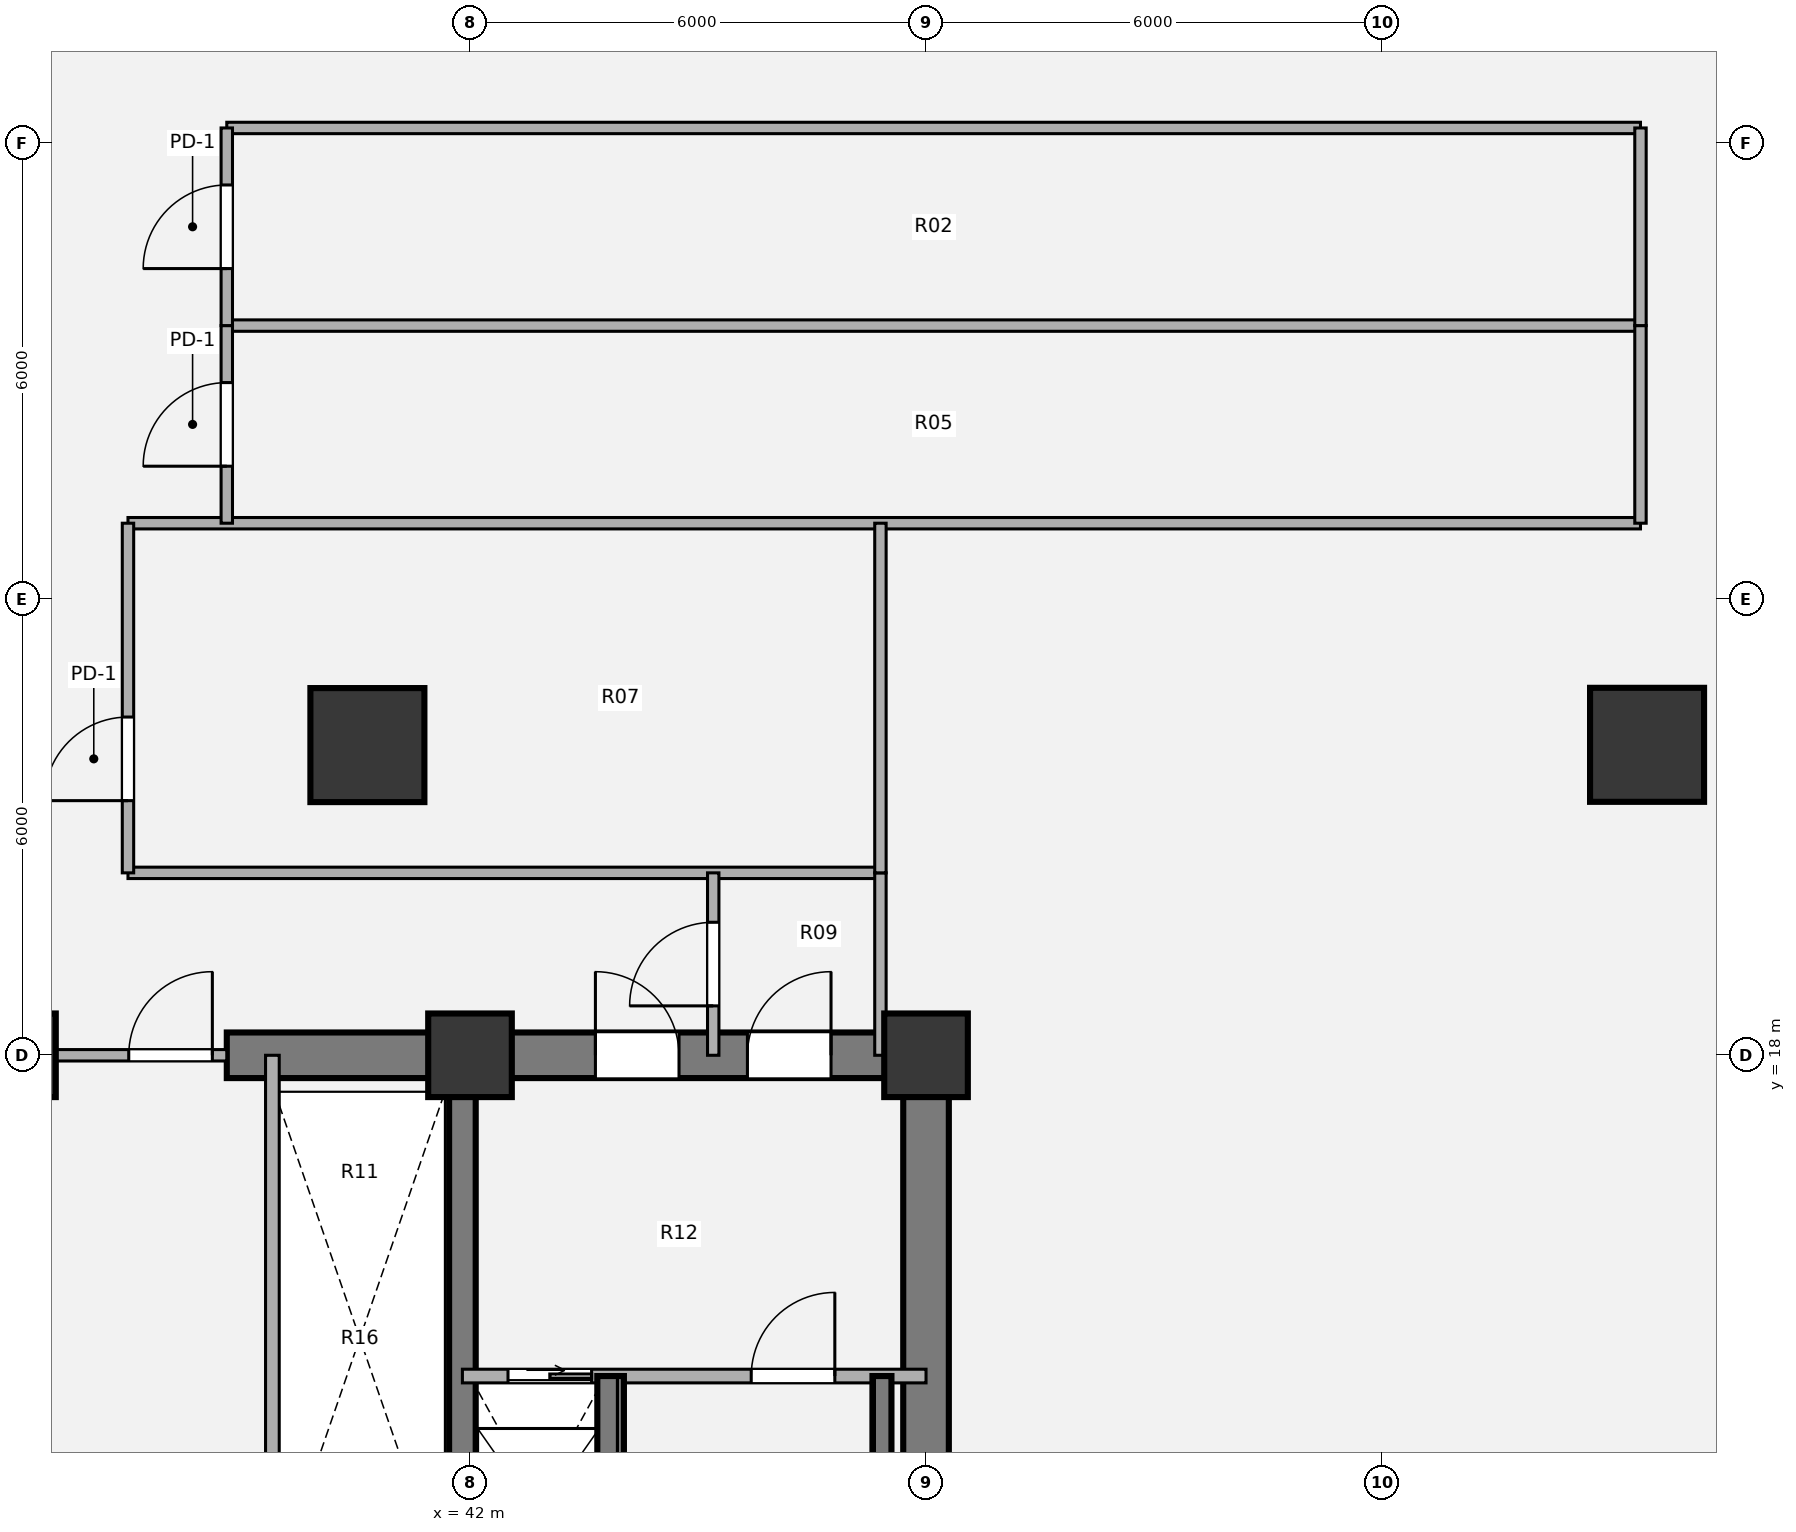
"""IFC4 building model, lengths in metres.
Left out: names, types, materials, properties, quantities, classifications, styles, units other than length and angle.
Written with IfcOpenShell. Run it as: python <this file> out.ifc"""

import sys

from ifc_helpers import new_model, si_unit, direction, frame, frame_2d, origin, origin_2d, place, context, subcontext, project, spatial, rectangle, hollow_circle, extrude, source, transform, mapped, element, fill, save


model = new_model("IFC4")
c1 = context("Model", 3, precision=1e-05, world=origin(), true_north=direction((0.0, 1.0)))
c2 = subcontext(c1, "Body", "Model", "MODEL_VIEW")
j1 = project(units=[si_unit("LENGTHUNIT", "METRE"), si_unit("PLANEANGLEUNIT", "RADIAN")], contexts=[c1])
p1 = place(None, origin())
s1 = spatial("IfcSite", under=j1, at=p1, CompositionType="ELEMENT")
p2 = place(p1, origin())
s2 = spatial("IfcBuilding", under=s1, at=p2, CompositionType="ELEMENT")
p3 = place(p2, frame((0.0, 0.0, 79.92)))
s3 = spatial("IfcBuildingStorey", under=s2, at=p3, CompositionType="ELEMENT", Elevation=79.92)
m1 = source(origin(), c2, "Body", "SweptSolid", [
    extrude(rectangle(XDim=1.1, YDim=1.1, at=origin_2d()), origin(), (0.0, 0.0, 1.0), 5.4),
])
for number, where, z_axis, x_axis in (
    (1, (36.0, 18.0, 0.0), (0.0, 0.0, 1.0), (1.0, 0.0, 0.0)),
    (2, (42.0, 18.0, 0.0), (0.0, 0.0, 1.0), (1.0, 0.0, 0.0)),
    (3, (48.0, 18.0, 0.0), (0.0, 0.0, 1.0), (1.0, 0.0, 0.0)),
):
    element("IfcColumn", number, at=place(p3, frame(where, z_axis=z_axis, x_axis=x_axis)), inside=s3, PredefinedType="COLUMN", context=c2, shape_type="MappedRepresentation", body=[
        mapped(m1, transform((0.0, 0.0, 0.0), x_axis=(1.0, 0.0, 0.0), y_axis=(0.0, 1.0, 0.0), z_axis=(0.0, 0.0, 1.0), scale=1.0)),
    ])
p4 = place(p3, frame((48.0, 18.0, 0.0), z_axis=(0.0, 0.0, 1.0), x_axis=(0.0, -1.0, 0.0)))
e4 = element("IfcWall", 4, at=p4, inside=s3, PredefinedType="SHEAR", context=c2, shape_type="SweptSolid", body=[
    extrude(rectangle(XDim=12.0, YDim=0.6, at=frame_2d((6.0, 0.0))), origin(), (0.0, 0.0, 1.0), 5.4),
])
p5 = place(p3, frame((38.8, 18.0, 0.0), z_axis=(0.0, 0.0, 1.0), x_axis=(1.0, 0.0, 0.0)))
e5 = element("IfcWall", 5, at=p5, inside=s3, PredefinedType="SHEAR", context=c2, shape_type="SweptSolid", body=[
    extrude(rectangle(XDim=9.5, YDim=0.6, at=frame_2d((4.75, 0.0))), origin(), (0.0, 0.0, 1.0), 5.4),
])
p6 = place(p5, frame((4.85, 0.0, 0.0)))
e6 = element("IfcOpeningElement", 6, at=p6, cuts=e5, PredefinedType="OPENING", context=c2, shape_type="SweptSolid", body=[
    extrude(rectangle(XDim=1.1, YDim=2.1, at=origin_2d()), frame((0.55, 0.31, 1.05), z_axis=(0.0, -1.0, 0.0), x_axis=(1.0, 0.0, 0.0)), (0.0, 0.0, 1.0), 0.62),
])
p7 = place(p5, frame((6.85, 0.0, 0.0)))
e7 = element("IfcOpeningElement", 7, at=p7, cuts=e5, PredefinedType="OPENING", context=c2, shape_type="SweptSolid", body=[
    extrude(rectangle(XDim=1.1, YDim=2.1, at=origin_2d()), frame((0.55, 0.31, 1.05), z_axis=(0.0, -1.0, 0.0), x_axis=(1.0, 0.0, 0.0)), (0.0, 0.0, 1.0), 0.62),
])
p8 = place(p3, frame((41.9, 18.0, 0.0), z_axis=(0.0, 0.0, 1.0), x_axis=(0.0, -1.0, 0.0)))
e8 = element("IfcWall", 8, at=p8, inside=s3, PredefinedType="SHEAR", context=c2, shape_type="SweptSolid", body=[
    extrude(rectangle(XDim=12.0, YDim=0.35, at=frame_2d((6.0, 0.0))), origin(), (0.0, 0.0, 1.0), 5.4),
])
p9 = place(p8, frame((10.08, 0.0, 0.0)))
e9 = element("IfcOpeningElement", 9, at=p9, cuts=e8, PredefinedType="OPENING", context=c2, shape_type="SweptSolid", body=[
    extrude(rectangle(XDim=1.3, YDim=2.1, at=origin_2d()), frame((0.65, 0.185, 1.05), z_axis=(0.0, -1.0, 0.0), x_axis=(1.0, 0.0, 0.0)), (0.0, 0.0, 1.0), 0.37),
])
m2 = source(origin(), c2, "Body", "SweptSolid", [
    extrude(hollow_circle(Radius=0.75, WallThickness=0.05, at=origin_2d()), origin(), (0.0, 0.0, 1.0), 6.169),
])
p10 = place(p3, frame((57.96, 20.292, 0.47), z_axis=(-0.153353617599, 0.581200316919, 0.799180117109), x_axis=(-0.966908028217, -0.255125194698, 0.0)))
e10 = element("IfcColumn", 10, at=p10, inside=s3, PredefinedType="COLUMN", context=c2, shape_type="MappedRepresentation", body=[
    mapped(m2, transform((0.0, 0.0, 0.0), x_axis=(1.0, 0.0, 0.0), y_axis=(0.0, 1.0, 0.0), z_axis=(0.0, 0.0, 1.0), scale=1.0)),
])
m3 = source(origin(), c2, "Body", "SweptSolid", [
    extrude(hollow_circle(Radius=0.75, WallThickness=0.05, at=origin_2d()), origin(), (0.0, 0.0, 1.0), 6.48),
])
p11 = place(p3, frame((57.952, 30.884, 0.511), z_axis=(-0.144794363389, 0.640139535252, 0.754490535221), x_axis=(-0.975360167554, -0.220618547611, 0.0)))
e11 = element("IfcColumn", 11, at=p11, inside=s3, PredefinedType="COLUMN", context=c2, shape_type="MappedRepresentation", body=[
    mapped(m3, transform((0.0, 0.0, 0.0), x_axis=(1.0, 0.0, 0.0), y_axis=(0.0, 1.0, 0.0), z_axis=(0.0, 0.0, 1.0), scale=1.0)),
])
m4 = source(origin(), c2, "Body", "SweptSolid", [
    extrude(hollow_circle(Radius=0.75, WallThickness=0.05, at=origin_2d()), origin(), (0.0, 0.0, 1.0), 6.108),
])
p12 = place(p3, frame((40.65, 20.285, 0.46), z_axis=(0.0, 0.588155061487, 0.808748183087), x_axis=(-1.0, 0.0, 0.0)))
e12 = element("IfcColumn", 12, at=p12, inside=s3, PredefinedType="COLUMN", context=c2, shape_type="MappedRepresentation", body=[
    mapped(m4, transform((0.0, 0.0, 0.0), x_axis=(1.0, 0.0, 0.0), y_axis=(0.0, 1.0, 0.0), z_axis=(0.0, 0.0, 1.0), scale=1.0)),
])
p13 = place(p3, frame((39.4, 11.0, 0.0), z_axis=(0.0, 0.0, 1.0), x_axis=(0.0, 1.0, 0.0)))
e13 = element("IfcWall", 13, at=p13, inside=s3, PredefinedType="PARTITIONING", context=c2, shape_type="SweptSolid", body=[
    extrude(rectangle(XDim=7.0, YDim=0.18, at=frame_2d((3.5, 0.0))), origin(), (0.0, 0.0, 1.0), 5.05),
])
p14 = place(p3, frame((33.2, 18.0, 0.0), z_axis=(0.0, 0.0, 1.0), x_axis=(1.0, 0.0, 0.0)))
e14 = element("IfcWall", 14, at=p14, inside=s3, PredefinedType="PARTITIONING", context=c2, shape_type="SweptSolid", body=[
    extrude(rectangle(XDim=5.6, YDim=0.15, at=frame_2d((2.8, 0.0))), origin(), (0.0, 0.0, 1.0), 3.865),
])
p15 = place(p14, frame((0.19, 0.0, 0.0)))
e15 = element("IfcOpeningElement", 15, at=p15, cuts=e14, PredefinedType="OPENING", context=c2, shape_type="SweptSolid", body=[
    extrude(rectangle(XDim=1.1, YDim=2.1, at=origin_2d()), frame((0.55, 0.085, 1.05), z_axis=(0.0, -1.0, 0.0), x_axis=(1.0, 0.0, 0.0)), (0.0, 0.0, 1.0), 0.17),
])
p16 = place(p14, frame((4.31, 0.0, 0.0)))
e16 = element("IfcOpeningElement", 16, at=p16, cuts=e14, PredefinedType="OPENING", context=c2, shape_type="SweptSolid", body=[
    extrude(rectangle(XDim=1.1, YDim=2.1, at=origin_2d()), frame((0.55, 0.085, 1.05), z_axis=(0.0, -1.0, 0.0), x_axis=(1.0, 0.0, 0.0)), (0.0, 0.0, 1.0), 0.17),
])
p17 = place(p3, frame((41.9, 13.78, 0.0), z_axis=(0.0, 0.0, 1.0), x_axis=(1.0, 0.0, 0.0)))
e17 = element("IfcWall", 17, at=p17, inside=s3, PredefinedType="PARTITIONING", context=c2, shape_type="SweptSolid", body=[
    extrude(rectangle(XDim=6.1, YDim=0.18, at=frame_2d((3.05, 0.0))), origin(), (0.0, 0.0, 1.0), 2.229),
])
p18 = place(p17, frame((0.6, 0.0, 0.0)))
e18 = element("IfcOpeningElement", 18, at=p18, cuts=e17, PredefinedType="OPENING", context=c2, shape_type="SweptSolid", body=[
    extrude(rectangle(XDim=1.1, YDim=2.1, at=origin_2d()), frame((0.55, 0.1, 1.05), z_axis=(0.0, -1.0, 0.0), x_axis=(1.0, 0.0, 0.0)), (0.0, 0.0, 1.0), 0.2),
])
p19 = place(p17, frame((3.8, 0.0, 0.0)))
e19 = element("IfcOpeningElement", 19, at=p19, cuts=e17, PredefinedType="OPENING", context=c2, shape_type="SweptSolid", body=[
    extrude(rectangle(XDim=1.1, YDim=2.1, at=origin_2d()), frame((0.55, 0.1, 1.05), z_axis=(0.0, -1.0, 0.0), x_axis=(1.0, 0.0, 0.0)), (0.0, 0.0, 1.0), 0.2),
])
p20 = place(p3, frame((43.85, 6.0, 0.0), z_axis=(0.0, 0.0, 1.0), x_axis=(0.0, 1.0, 0.0)))
e20 = element("IfcWall", 20, at=p20, inside=s3, PredefinedType="SHEAR", context=c2, shape_type="SweptSolid", body=[
    extrude(rectangle(XDim=7.78, YDim=0.35, at=frame_2d((3.89, 0.0))), origin(), (0.0, 0.0, 1.0), 5.4),
])
p21 = place(p3, frame((47.42, 6.0, 0.0), z_axis=(0.0, 0.0, 1.0), x_axis=(0.0, 1.0, 0.0)))
e21 = element("IfcWall", 21, at=p21, inside=s3, PredefinedType="SHEAR", context=c2, shape_type="SweptSolid", body=[
    extrude(rectangle(XDim=7.78, YDim=0.25, at=frame_2d((3.89, 0.0))), origin(), (0.0, 0.0, 1.0), 5.4),
])
p22 = place(p3, frame((37.5, 20.4, 0.0), z_axis=(0.0, 0.0, 1.0), x_axis=(1.0, 0.0, 0.0)))
e22 = element("IfcWall", 22, at=p22, inside=s3, PredefinedType="PARTITIONING", context=c2, shape_type="SweptSolid", body=[
    extrude(rectangle(XDim=9.9, YDim=0.15, at=frame_2d((4.95, 0.0))), origin(), (0.0, 0.0, 1.0), 5.05),
])
p23 = place(p3, frame((37.5, 25.0, 0.0), z_axis=(0.0, 0.0, 1.0), x_axis=(1.0, 0.0, 0.0)))
e23 = element("IfcWall", 23, at=p23, inside=s3, PredefinedType="PARTITIONING", context=c2, shape_type="SweptSolid", body=[
    extrude(rectangle(XDim=19.9, YDim=0.15, at=frame_2d((9.95, 0.0))), origin(), (0.0, 0.0, 1.0), 4.532),
])
for number, where, z_axis, x_axis in (
    (24, (38.8, 27.6, 0.0), (0.0, 0.0, 1.0), (1.0, 0.0, 0.0)),
    (25, (38.8, 30.2, 0.0), (0.0, 0.0, 1.0), (1.0, 0.0, 0.0)),
):
    element("IfcWall", number, at=place(p3, frame(where, z_axis=z_axis, x_axis=x_axis)), inside=s3, PredefinedType="PARTITIONING", context=c2, shape_type="SweptSolid", body=[
        extrude(rectangle(XDim=18.6, YDim=0.15, at=frame_2d((9.3, 0.0))), origin(), (0.0, 0.0, 1.0), 4.532),
    ])
p24 = place(p3, frame((37.5, 20.4, 0.0), z_axis=(0.0, 0.0, 1.0), x_axis=(0.0, 1.0, 0.0)))
e26 = element("IfcWall", 26, at=p24, inside=s3, PredefinedType="PARTITIONING", context=c2, shape_type="SweptSolid", body=[
    extrude(rectangle(XDim=4.6, YDim=0.15, at=frame_2d((2.3, 0.0))), origin(), (0.0, 0.0, 1.0), 5.05),
])
p25 = place(p24, frame((0.95, 0.0, 0.0)))
e27 = element("IfcOpeningElement", 27, at=p25, cuts=e26, PredefinedType="OPENING", context=c2, shape_type="SweptSolid", body=[
    extrude(rectangle(XDim=1.1, YDim=2.1, at=origin_2d()), frame((0.55, 0.085, 1.05), z_axis=(0.0, -1.0, 0.0), x_axis=(1.0, 0.0, 0.0)), (0.0, 0.0, 1.0), 0.17),
])
p26 = place(p3, frame((38.8, 25.0, 0.0), z_axis=(0.0, 0.0, 1.0), x_axis=(0.0, 1.0, 0.0)))
e28 = element("IfcWall", 28, at=p26, inside=s3, PredefinedType="PARTITIONING", context=c2, shape_type="SweptSolid", body=[
    extrude(rectangle(XDim=2.6, YDim=0.15, at=frame_2d((1.3, 0.0))), origin(), (0.0, 0.0, 1.0), 5.05),
])
p27 = place(p26, frame((0.75, 0.0, 0.0)))
e29 = element("IfcOpeningElement", 29, at=p27, cuts=e28, PredefinedType="OPENING", context=c2, shape_type="SweptSolid", body=[
    extrude(rectangle(XDim=1.1, YDim=2.1, at=origin_2d()), frame((0.55, 0.085, 1.05), z_axis=(0.0, -1.0, 0.0), x_axis=(1.0, 0.0, 0.0)), (0.0, 0.0, 1.0), 0.17),
])
p28 = place(p3, frame((38.8, 27.6, 0.0), z_axis=(0.0, 0.0, 1.0), x_axis=(0.0, 1.0, 0.0)))
e30 = element("IfcWall", 30, at=p28, inside=s3, PredefinedType="PARTITIONING", context=c2, shape_type="SweptSolid", body=[
    extrude(rectangle(XDim=2.6, YDim=0.15, at=frame_2d((1.3, 0.0))), origin(), (0.0, 0.0, 1.0), 5.05),
])
p29 = place(p28, frame((0.75, 0.0, 0.0)))
e31 = element("IfcOpeningElement", 31, at=p29, cuts=e30, PredefinedType="OPENING", context=c2, shape_type="SweptSolid", body=[
    extrude(rectangle(XDim=1.1, YDim=2.1, at=origin_2d()), frame((0.55, 0.085, 1.05), z_axis=(0.0, -1.0, 0.0), x_axis=(1.0, 0.0, 0.0)), (0.0, 0.0, 1.0), 0.17),
])
p30 = place(p3, frame((45.2, 18.0, 0.0), z_axis=(0.0, 0.0, 1.0), x_axis=(0.0, 1.0, 0.0)))
e32 = element("IfcWall", 32, at=p30, inside=s3, PredefinedType="PARTITIONING", context=c2, shape_type="SweptSolid", body=[
    extrude(rectangle(XDim=2.4, YDim=0.15, at=frame_2d((1.2, 0.0))), origin(), (0.0, 0.0, 1.0), 5.05),
])
p31 = place(p30, frame((0.65, 0.0, 0.0)))
e33 = element("IfcOpeningElement", 33, at=p31, cuts=e32, PredefinedType="OPENING", context=c2, shape_type="SweptSolid", body=[
    extrude(rectangle(XDim=1.1, YDim=2.1, at=origin_2d()), frame((0.55, 0.085, 1.05), z_axis=(0.0, -1.0, 0.0), x_axis=(1.0, 0.0, 0.0)), (0.0, 0.0, 1.0), 0.17),
])
p32 = place(p3, frame((47.4, 18.0, 0.0), z_axis=(0.0, 0.0, 1.0), x_axis=(0.0, 1.0, 0.0)))
e34 = element("IfcWall", 34, at=p32, inside=s3, PredefinedType="PARTITIONING", context=c2, shape_type="SweptSolid", body=[
    extrude(rectangle(XDim=2.4, YDim=0.15, at=frame_2d((1.2, 0.0))), origin(), (0.0, 0.0, 1.0), 5.05),
])
p33 = place(p3, frame((47.4, 20.4, 0.0), z_axis=(0.0, 0.0, 1.0), x_axis=(0.0, 1.0, 0.0)))
e35 = element("IfcWall", 35, at=p33, inside=s3, PredefinedType="PARTITIONING", context=c2, shape_type="SweptSolid", body=[
    extrude(rectangle(XDim=4.6, YDim=0.15, at=frame_2d((2.3, 0.0))), origin(), (0.0, 0.0, 1.0), 5.05),
])
p34 = place(p3, frame((57.4, 25.0, 0.0), z_axis=(0.0, 0.0, 1.0), x_axis=(0.0, 1.0, 0.0)))
e36 = element("IfcWall", 36, at=p34, inside=s3, PredefinedType="PARTITIONING", context=c2, shape_type="SweptSolid", body=[
    extrude(rectangle(XDim=2.6, YDim=0.15, at=frame_2d((1.3, 0.0))), origin(), (0.0, 0.0, 1.0), 5.05),
])
p35 = place(p3, frame((57.4, 27.6, 0.0), z_axis=(0.0, 0.0, 1.0), x_axis=(0.0, 1.0, 0.0)))
e37 = element("IfcWall", 37, at=p35, inside=s3, PredefinedType="PARTITIONING", context=c2, shape_type="SweptSolid", body=[
    extrude(rectangle(XDim=2.6, YDim=0.15, at=frame_2d((1.3, 0.0))), origin(), (0.0, 0.0, 1.0), 5.05),
])
m5 = source(origin(), c2, "Body", "SweptSolid", [
    extrude(rectangle(XDim=1.1, YDim=2.1, at=origin_2d()), frame((0.55, 0.025, 1.05), z_axis=(0.0, -1.0, 0.0), x_axis=(1.0, 0.0, 0.0)), (0.0, 0.0, 1.0), 0.05),
])
p36 = place(p16, origin())
e38 = element("IfcDoor", 38, at=p36, inside=s3, OperationType="SINGLE_SWING_RIGHT", PredefinedType="DOOR", context=c2, shape_type="MappedRepresentation", body=[
    mapped(m5, transform((0.0, 0.0, 0.0), x_axis=(1.0, 0.0, 0.0), y_axis=(0.0, 1.0, 0.0), z_axis=(0.0, 0.0, 1.0), scale=1.0)),
])
fill(e16, e38)
m6 = source(origin(), c2, "Body", "SweptSolid", [
    extrude(rectangle(XDim=1.1, YDim=2.1, at=origin_2d()), frame((0.55, 0.025, 1.05), z_axis=(0.0, -1.0, 0.0), x_axis=(1.0, 0.0, 0.0)), (0.0, 0.0, 1.0), 0.05),
])
p37 = place(p18, origin())
e39 = element("IfcDoor", 39, at=p37, inside=s3, OperationType="SLIDING_TO_RIGHT", PredefinedType="DOOR", context=c2, shape_type="MappedRepresentation", body=[
    mapped(m6, transform((0.0, 0.0, 0.0), x_axis=(1.0, 0.0, 0.0), y_axis=(0.0, 1.0, 0.0), z_axis=(0.0, 0.0, 1.0), scale=1.0)),
])
fill(e18, e39)
m7 = source(origin(), c2, "Body", "SweptSolid", [
    extrude(rectangle(XDim=1.1, YDim=2.1, at=origin_2d()), frame((0.55, 0.025, 1.05), z_axis=(0.0, -1.0, 0.0), x_axis=(1.0, 0.0, 0.0)), (0.0, 0.0, 1.0), 0.05),
])
p38 = place(p19, origin())
e40 = element("IfcDoor", 40, at=p38, inside=s3, OperationType="SINGLE_SWING_RIGHT", PredefinedType="DOOR", context=c2, shape_type="MappedRepresentation", body=[
    mapped(m7, transform((0.0, 0.0, 0.0), x_axis=(1.0, 0.0, 0.0), y_axis=(0.0, 1.0, 0.0), z_axis=(0.0, 0.0, 1.0), scale=1.0)),
])
fill(e19, e40)
p39 = place(p6, origin())
e41 = element("IfcDoor", 41, at=p39, inside=s3, OperationType="SINGLE_SWING_LEFT", PredefinedType="DOOR", context=c2, shape_type="MappedRepresentation", body=[
    mapped(m5, transform((0.0, 0.0, 0.0), x_axis=(1.0, 0.0, 0.0), y_axis=(0.0, 1.0, 0.0), z_axis=(0.0, 0.0, 1.0), scale=1.0)),
])
fill(e6, e41)
p40 = place(p7, origin())
e42 = element("IfcDoor", 42, at=p40, inside=s3, OperationType="SINGLE_SWING_RIGHT", PredefinedType="DOOR", context=c2, shape_type="MappedRepresentation", body=[
    mapped(m5, transform((0.0, 0.0, 0.0), x_axis=(1.0, 0.0, 0.0), y_axis=(0.0, 1.0, 0.0), z_axis=(0.0, 0.0, 1.0), scale=1.0)),
])
fill(e7, e42)
m8 = source(origin(), c2, "Body", "SweptSolid", [
    extrude(rectangle(XDim=1.1, YDim=2.1, at=origin_2d()), frame((0.55, 0.025, 1.05), z_axis=(0.0, -1.0, 0.0), x_axis=(1.0, 0.0, 0.0)), (0.0, 0.0, 1.0), 0.05),
])
p41 = place(p25, origin())
e43 = element("IfcDoor", 43, at=p41, inside=s3, OperationType="SINGLE_SWING_LEFT", PredefinedType="DOOR", context=c2, shape_type="MappedRepresentation", body=[
    mapped(m8, transform((0.0, 0.0, 0.0), x_axis=(1.0, 0.0, 0.0), y_axis=(0.0, 1.0, 0.0), z_axis=(0.0, 0.0, 1.0), scale=1.0)),
])
fill(e27, e43)
p42 = place(p27, origin())
e44 = element("IfcDoor", 44, at=p42, inside=s3, OperationType="SINGLE_SWING_LEFT", PredefinedType="DOOR", context=c2, shape_type="MappedRepresentation", body=[
    mapped(m8, transform((0.0, 0.0, 0.0), x_axis=(1.0, 0.0, 0.0), y_axis=(0.0, 1.0, 0.0), z_axis=(0.0, 0.0, 1.0), scale=1.0)),
])
fill(e29, e44)
p43 = place(p29, origin())
e45 = element("IfcDoor", 45, at=p43, inside=s3, OperationType="SINGLE_SWING_LEFT", PredefinedType="DOOR", context=c2, shape_type="MappedRepresentation", body=[
    mapped(m8, transform((0.0, 0.0, 0.0), x_axis=(1.0, 0.0, 0.0), y_axis=(0.0, 1.0, 0.0), z_axis=(0.0, 0.0, 1.0), scale=1.0)),
])
fill(e31, e45)
p44 = place(p31, origin())
e46 = element("IfcDoor", 46, at=p44, inside=s3, OperationType="SINGLE_SWING_LEFT", PredefinedType="DOOR", context=c2, shape_type="MappedRepresentation", body=[
    mapped(m8, transform((0.0, 0.0, 0.0), x_axis=(1.0, 0.0, 0.0), y_axis=(0.0, 1.0, 0.0), z_axis=(0.0, 0.0, 1.0), scale=1.0)),
])
fill(e33, e46)
save(model, sys.argv[1])
